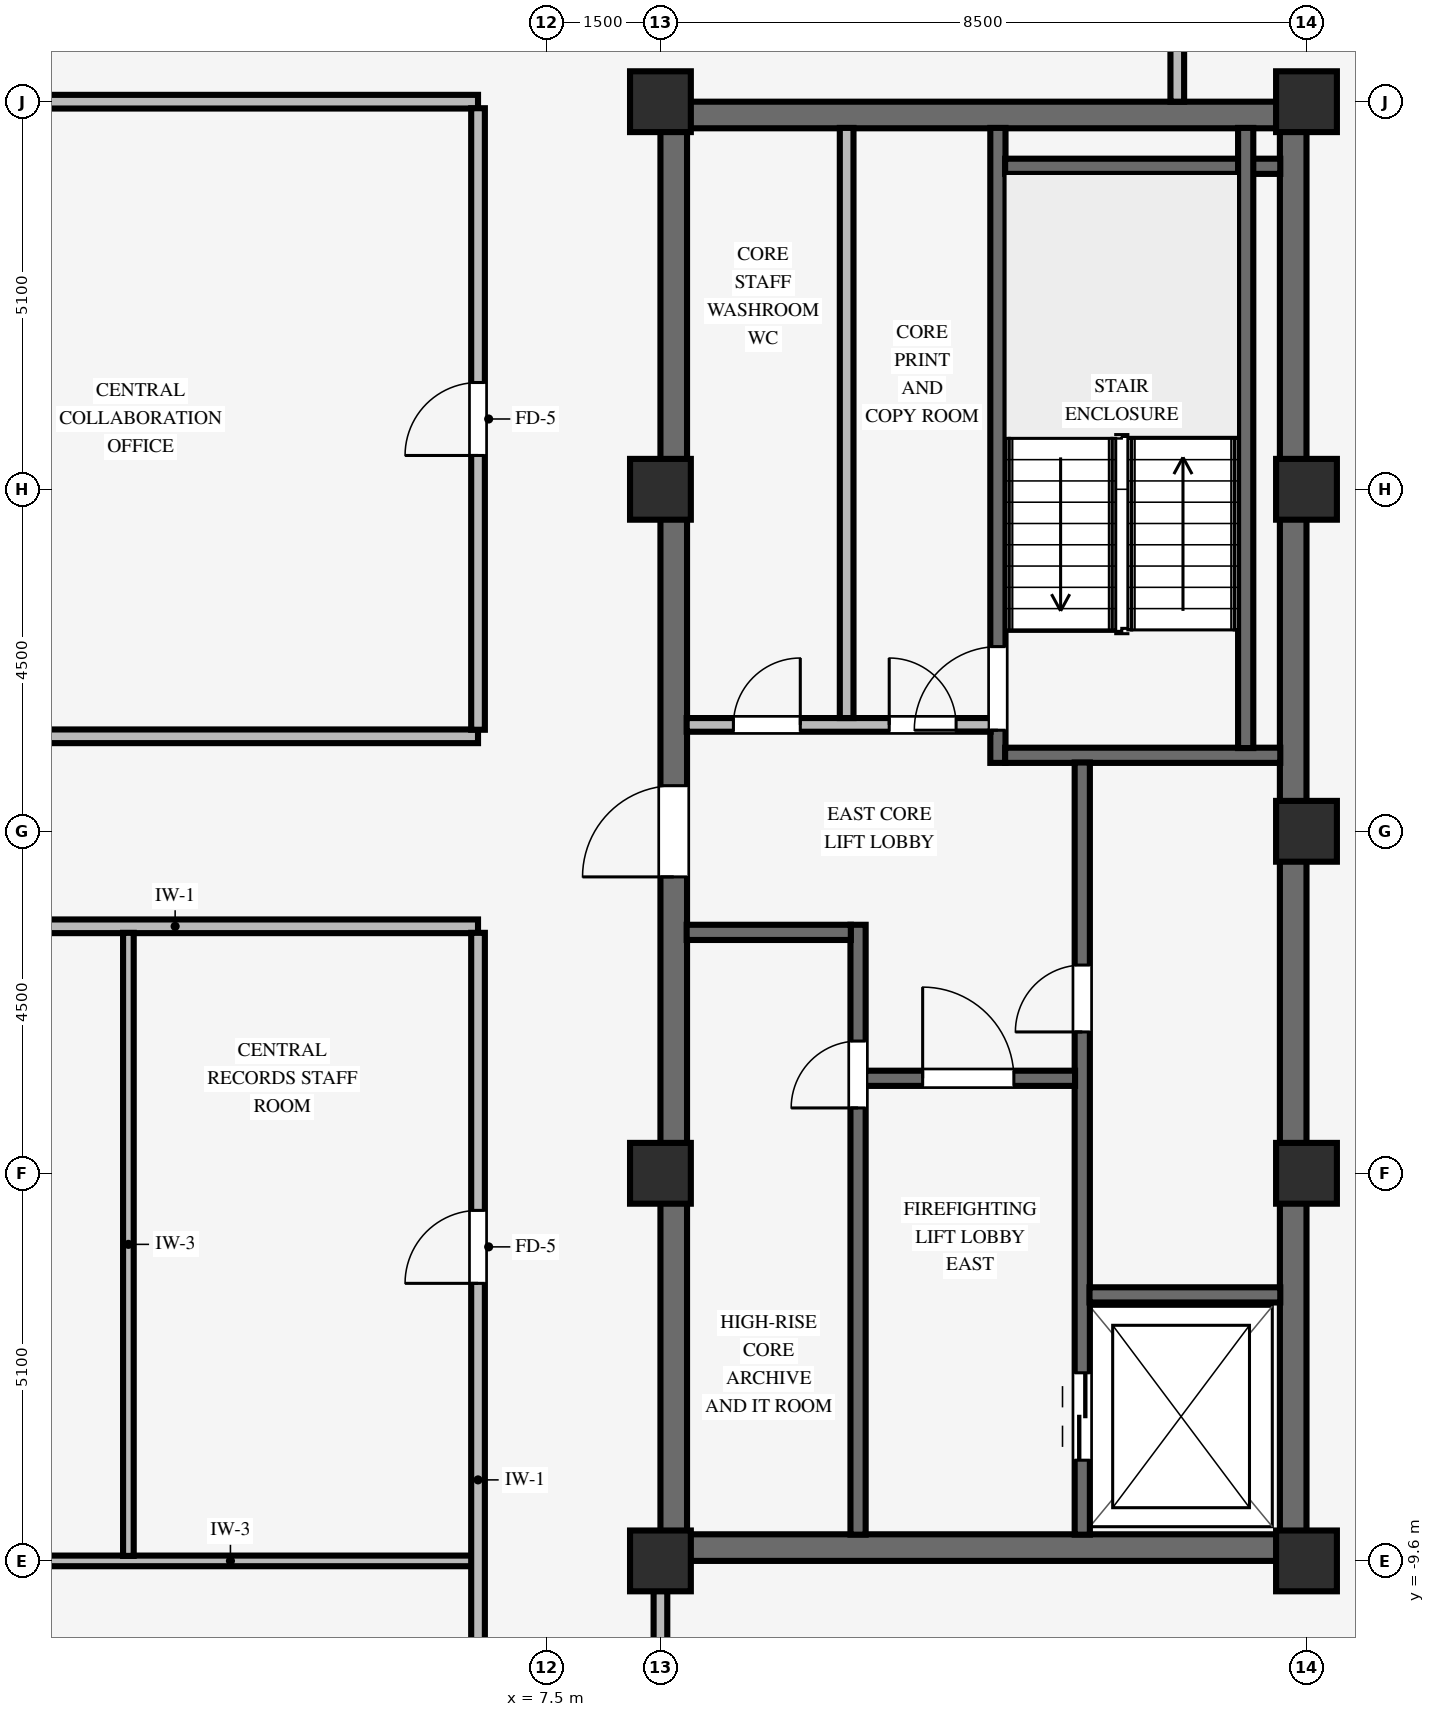
"""IFC4 building model, lengths in metres.
Left out: names, types, materials, properties, quantities, classifications, styles, units other than length and angle.
Written with IfcOpenShell. Run it as: python <this file> out.ifc"""

import sys

from ifc_helpers import new_model, si_unit, direction, frame, frame_2d, origin, origin_2d, place, context, subcontext, project, spatial, rectangle, extrude, source, transform, mapped, element, fill, save


model = new_model("IFC4")
c1 = context("Model", 3, precision=1e-05, world=origin(), true_north=direction((0.0, 1.0)))
c2 = subcontext(c1, "Body", "Model", "MODEL_VIEW")
j1 = project(units=[si_unit("LENGTHUNIT", "METRE"), si_unit("PLANEANGLEUNIT", "RADIAN")], contexts=[c1])
p1 = place(None, origin())
s1 = spatial("IfcSite", under=j1, at=p1, CompositionType="ELEMENT")
p2 = place(p1, origin())
s2 = spatial("IfcBuilding", under=s1, at=p2, CompositionType="ELEMENT")
p3 = place(p2, frame((0.0, 0.0, 279.85)))
s3 = spatial("IfcBuildingStorey", under=s2, at=p3, CompositionType="ELEMENT", Elevation=279.85)
for number, where, z_axis, x_axis in (
    (1, (9.0, -9.425, 0.0), (0.0, 0.0, 1.0), (1.0, 0.0, 0.0)),
    (2, (9.0, 9.425, 0.0), (0.0, 0.0, 1.0), (1.0, 0.0, 0.0)),
):
    element("IfcWall", number, at=place(p3, frame(where, z_axis=z_axis, x_axis=x_axis)), inside=s3, PredefinedType="SHEAR", context=c2, shape_type="SweptSolid", body=[
        extrude(rectangle(XDim=8.5, YDim=0.35, at=frame_2d((4.25, 0.0))), origin(), (0.0, 0.0, 1.0), 3.37),
    ])
p4 = place(p3, frame((9.175, -9.255, 0.0), z_axis=(0.0, 0.0, 1.0), x_axis=(0.0, 1.0, 0.0)))
e3 = element("IfcWall", 3, at=p4, inside=s3, PredefinedType="SHEAR", context=c2, shape_type="SweptSolid", body=[
    extrude(rectangle(XDim=18.51, YDim=0.35, at=frame_2d((9.255, 0.0))), origin(), (0.0, 0.0, 1.0), 3.37),
])
p5 = place(p4, frame((8.655, 0.0, 0.0)))
e4 = element("IfcOpeningElement", 4, at=p5, cuts=e3, PredefinedType="OPENING", context=c2, shape_type="SweptSolid", body=[
    extrude(rectangle(XDim=1.2, YDim=2.15, at=frame_2d((0.6, 1.075))), frame((0.0, 0.185, 0.0), z_axis=(0.0, -1.0, 0.0), x_axis=(1.0, 0.0, 0.0)), (0.0, 0.0, 1.0), 0.37),
])
p6 = place(p3, frame((17.325, -9.255, 0.0), z_axis=(0.0, 0.0, 1.0), x_axis=(0.0, 1.0, 0.0)))
e5 = element("IfcWall", 5, at=p6, inside=s3, PredefinedType="SHEAR", context=c2, shape_type="SweptSolid", body=[
    extrude(rectangle(XDim=18.51, YDim=0.35, at=frame_2d((9.255, 0.0))), origin(), (0.0, 0.0, 1.0), 3.37),
])
for number, where, z_axis, x_axis in (
    (6, (9.0, -9.6, 0.0), (0.0, 0.0, 1.0), (1.0, 0.0, 0.0)),
    (7, (9.0, -4.5, 0.0), (0.0, 0.0, 1.0), (1.0, 0.0, 0.0)),
    (8, (9.0, 4.5, 0.0), (0.0, 0.0, 1.0), (1.0, 0.0, 0.0)),
    (9, (9.0, 9.6, 0.0), (0.0, 0.0, 1.0), (1.0, 0.0, 0.0)),
    (10, (17.5, -9.6, 0.0), (0.0, 0.0, 1.0), (1.0, 0.0, 0.0)),
    (11, (17.5, -4.5, 0.0), (0.0, 0.0, 1.0), (1.0, 0.0, 0.0)),
    (12, (17.5, 4.5, 0.0), (0.0, 0.0, 1.0), (1.0, 0.0, 0.0)),
    (13, (17.5, 9.6, 0.0), (0.0, 0.0, 1.0), (1.0, 0.0, 0.0)),
    (14, (17.5, 0.0, 0.0), (0.0, 0.0, 1.0), (1.0, 0.0, 0.0)),
):
    element("IfcColumn", number, at=place(p3, frame(where, z_axis=z_axis, x_axis=x_axis)), inside=s3, PredefinedType="COLUMN", context=c2, shape_type="SweptSolid", body=[
        extrude(rectangle(XDim=0.8, YDim=0.8, at=origin_2d()), origin(), (0.0, 0.0, 1.0), 3.37),
    ])
p7 = place(p3, frame((13.44, 0.9, 0.0), z_axis=(0.0, 0.0, 1.0), x_axis=(0.0, 1.0, 0.0)))
e15 = element("IfcWall", 15, at=p7, inside=s3, PredefinedType="SHEAR", context=c2, shape_type="SweptSolid", body=[
    extrude(rectangle(XDim=8.355, YDim=0.2, at=frame_2d((4.177, 0.0))), origin(), (0.0, 0.0, 1.0), 3.37),
])
p8 = place(p7, frame((0.43, 0.0, 0.0)))
e16 = element("IfcOpeningElement", 16, at=p8, cuts=e15, PredefinedType="OPENING", context=c2, shape_type="SweptSolid", body=[
    extrude(rectangle(XDim=1.1, YDim=2.15, at=frame_2d((0.55, 1.075))), frame((0.0, 0.11, 0.0), z_axis=(0.0, -1.0, 0.0), x_axis=(1.0, 0.0, 0.0)), (0.0, 0.0, 1.0), 0.22),
])
for number, where, z_axis, x_axis in (
    (17, (13.535, 1.0, 0.0), (0.0, 0.0, 1.0), (1.0, 0.0, 0.0)),
    (18, (13.535, 8.75, 0.0), (0.0, 0.0, 1.0), (1.0, 0.0, 0.0)),
):
    element("IfcWall", number, at=place(p3, frame(where, z_axis=z_axis, x_axis=x_axis)), inside=s3, PredefinedType="SHEAR", context=c2, shape_type="SweptSolid", body=[
        extrude(rectangle(XDim=3.62, YDim=0.2, at=frame_2d((1.81, 0.0))), origin(), (0.0, 0.0, 1.0), 3.37),
    ])
p9 = place(p3, frame((16.7, 1.095, 0.0), z_axis=(0.0, 0.0, 1.0), x_axis=(0.0, 1.0, 0.0)))
e19 = element("IfcWall", 19, at=p9, inside=s3, PredefinedType="SHEAR", context=c2, shape_type="SweptSolid", body=[
    extrude(rectangle(XDim=8.16, YDim=0.2, at=frame_2d((4.08, 0.0))), origin(), (0.0, 0.0, 1.0), 3.37),
])
p10 = place(p3, frame((14.55, -9.255, 0.0), z_axis=(0.0, 0.0, 1.0), x_axis=(0.0, 1.0, 0.0)))
e20 = element("IfcWall", 20, at=p10, inside=s3, PredefinedType="SHEAR", context=c2, shape_type="SweptSolid", body=[
    extrude(rectangle(XDim=10.16, YDim=0.2, at=frame_2d((5.08, 0.0))), origin(), (0.0, 0.0, 1.0), 3.37),
])
p11 = place(p10, frame((6.615, 0.0, 0.0)))
e21 = element("IfcOpeningElement", 21, at=p11, cuts=e20, PredefinedType="OPENING", context=c2, shape_type="SweptSolid", body=[
    extrude(rectangle(XDim=0.88, YDim=2.1, at=frame_2d((0.44, 1.05))), frame((0.0, 0.11, 0.0), z_axis=(0.0, -1.0, 0.0), x_axis=(1.0, 0.0, 0.0)), (0.0, 0.0, 1.0), 0.22),
])
p12 = place(p10, frame((0.98, 0.0, 0.0)))
e22 = element("IfcOpeningElement", 22, at=p12, cuts=e20, PredefinedType="OPENING", context=c2, shape_type="SweptSolid", body=[
    extrude(rectangle(XDim=1.15, YDim=2.15, at=frame_2d((0.575, 1.075))), frame((0.0, 0.11, 0.0), z_axis=(0.0, -1.0, 0.0), x_axis=(1.0, 0.0, 0.0)), (0.0, 0.0, 1.0), 0.22),
])
p13 = place(p3, frame((14.645, -6.1, 0.0), z_axis=(0.0, 0.0, 1.0), x_axis=(1.0, 0.0, 0.0)))
e23 = element("IfcWall", 23, at=p13, inside=s3, PredefinedType="SHEAR", context=c2, shape_type="SweptSolid", body=[
    extrude(rectangle(XDim=2.51, YDim=0.2, at=frame_2d((1.255, 0.0))), origin(), (0.0, 0.0, 1.0), 3.37),
])
p14 = place(p3, frame((11.6, -9.255, 0.0), z_axis=(0.0, 0.0, 1.0), x_axis=(0.0, 1.0, 0.0)))
e24 = element("IfcWall", 24, at=p14, inside=s3, PredefinedType="SHEAR", context=c2, shape_type="SweptSolid", body=[
    extrude(rectangle(XDim=8.025, YDim=0.2, at=frame_2d((4.012, 0.0))), origin(), (0.0, 0.0, 1.0), 3.37),
])
p15 = place(p14, frame((5.615, 0.0, 0.0)))
e25 = element("IfcOpeningElement", 25, at=p15, cuts=e24, PredefinedType="OPENING", context=c2, shape_type="SweptSolid", body=[
    extrude(rectangle(XDim=0.88, YDim=2.1, at=frame_2d((0.44, 1.05))), frame((0.0, 0.11, 0.0), z_axis=(0.0, -1.0, 0.0), x_axis=(1.0, 0.0, 0.0)), (0.0, 0.0, 1.0), 0.22),
])
p16 = place(p3, frame((11.695, -3.25, 0.0), z_axis=(0.0, 0.0, 1.0), x_axis=(1.0, 0.0, 0.0)))
e26 = element("IfcWall", 26, at=p16, inside=s3, PredefinedType="SHEAR", context=c2, shape_type="SweptSolid", body=[
    extrude(rectangle(XDim=2.76, YDim=0.2, at=frame_2d((1.38, 0.0))), origin(), (0.0, 0.0, 1.0), 3.37),
])
p17 = place(p16, frame((0.755, 0.0, 0.0)))
e27 = element("IfcOpeningElement", 27, at=p17, cuts=e26, PredefinedType="OPENING", context=c2, shape_type="SweptSolid", body=[
    extrude(rectangle(XDim=1.2, YDim=2.15, at=frame_2d((0.6, 1.075))), frame((0.0, 0.11, 0.0), z_axis=(0.0, -1.0, 0.0), x_axis=(1.0, 0.0, 0.0)), (0.0, 0.0, 1.0), 0.22),
])
p18 = place(p3, frame((9.345, -1.33, 0.0), z_axis=(0.0, 0.0, 1.0), x_axis=(1.0, 0.0, 0.0)))
e28 = element("IfcWall", 28, at=p18, inside=s3, PredefinedType="SHEAR", context=c2, shape_type="SweptSolid", body=[
    extrude(rectangle(XDim=2.16, YDim=0.2, at=frame_2d((1.08, 0.0))), origin(), (0.0, 0.0, 1.0), 3.37),
])
p19 = place(p3, frame((9.345, 1.4, 0.0), z_axis=(0.0, 0.0, 1.0), x_axis=(1.0, 0.0, 0.0)))
e29 = element("IfcWall", 29, at=p19, inside=s3, PredefinedType="PARTITIONING", context=c2, shape_type="SweptSolid", body=[
    extrude(rectangle(XDim=4.0, YDim=0.18, at=frame_2d((2.0, 0.0))), origin(), (0.0, 0.0, 1.0), 3.36),
])
p20 = place(p19, frame((0.615, 0.0, 0.0)))
e30 = element("IfcOpeningElement", 30, at=p20, cuts=e29, PredefinedType="OPENING", context=c2, shape_type="SweptSolid", body=[
    extrude(rectangle(XDim=0.88, YDim=2.1, at=frame_2d((0.44, 1.05))), frame((0.0, 0.1, 0.0), z_axis=(0.0, -1.0, 0.0), x_axis=(1.0, 0.0, 0.0)), (0.0, 0.0, 1.0), 0.2),
])
p21 = place(p19, frame((2.665, 0.0, 0.0)))
e31 = element("IfcOpeningElement", 31, at=p21, cuts=e29, PredefinedType="OPENING", context=c2, shape_type="SweptSolid", body=[
    extrude(rectangle(XDim=0.88, YDim=2.1, at=frame_2d((0.44, 1.05))), frame((0.0, 0.1, 0.0), z_axis=(0.0, -1.0, 0.0), x_axis=(1.0, 0.0, 0.0)), (0.0, 0.0, 1.0), 0.2),
])
p22 = place(p3, frame((11.45, 1.49, 0.0), z_axis=(0.0, 0.0, 1.0), x_axis=(0.0, 1.0, 0.0)))
e32 = element("IfcWall", 32, at=p22, inside=s3, PredefinedType="PARTITIONING", context=c2, shape_type="SweptSolid", body=[
    extrude(rectangle(XDim=7.765, YDim=0.18, at=frame_2d((3.882, 0.0))), origin(), (0.0, 0.0, 1.0), 3.36),
])
p23 = place(p3, frame((0.151, -9.6, 0.0), z_axis=(0.0, 0.0, 1.0), x_axis=(1.0, 0.0, 0.0)))
e33 = element("IfcWall", 33, at=p23, inside=s3, PredefinedType="PARTITIONING", context=c2, shape_type="SweptSolid", body=[
    extrude(rectangle(XDim=6.383, YDim=0.14, at=frame_2d((3.191, 0.0))), origin(), (0.0, 0.0, 1.0), 2.405),
])
p24 = place(p3, frame((-6.6, -1.25, 0.0), z_axis=(0.0, 0.0, 1.0), x_axis=(1.0, 0.0, 0.0)))
e34 = element("IfcWall", 34, at=p24, inside=s3, PredefinedType="PARTITIONING", context=c2, shape_type="SweptSolid", body=[
    extrude(rectangle(XDim=13.2, YDim=0.18, at=frame_2d((6.6, 0.0))), origin(), (0.0, 0.0, 1.0), 3.36),
])
p25 = place(p24, frame((3.82, 0.0, 0.0)))
e35 = element("IfcOpeningElement", 35, at=p25, cuts=e34, PredefinedType="OPENING", context=c2, shape_type="SweptSolid", body=[
    extrude(rectangle(XDim=0.96, YDim=2.1, at=frame_2d((0.48, 1.05))), frame((0.0, 0.1, 0.0), z_axis=(0.0, -1.0, 0.0), x_axis=(1.0, 0.0, 0.0)), (0.0, 0.0, 1.0), 0.2),
])
p26 = place(p3, frame((-6.6, 1.25, 0.0), z_axis=(0.0, 0.0, 1.0), x_axis=(1.0, 0.0, 0.0)))
e36 = element("IfcWall", 36, at=p26, inside=s3, PredefinedType="PARTITIONING", context=c2, shape_type="SweptSolid", body=[
    extrude(rectangle(XDim=13.2, YDim=0.18, at=frame_2d((6.6, 0.0))), origin(), (0.0, 0.0, 1.0), 3.36),
])
p27 = place(p3, frame((0.151, 9.6, 0.0), z_axis=(0.0, 0.0, 1.0), x_axis=(1.0, 0.0, 0.0)))
e37 = element("IfcWall", 37, at=p27, inside=s3, PredefinedType="PARTITIONING", context=c2, shape_type="SweptSolid", body=[
    extrude(rectangle(XDim=6.449, YDim=0.18, at=frame_2d((3.225, 0.0))), origin(), (0.0, 0.0, 1.0), 2.405),
])
p28 = place(p3, frame((2.0, -9.534, 0.0), z_axis=(0.0, 0.0, 1.0), x_axis=(0.0, 1.0, 0.0)))
e38 = element("IfcWall", 38, at=p28, inside=s3, PredefinedType="PARTITIONING", context=c2, shape_type="SweptSolid", body=[
    extrude(rectangle(XDim=8.198, YDim=0.14, at=frame_2d((4.099, 0.0))), origin(), (0.0, 0.0, 1.0), 3.36),
])
p29 = place(p3, frame((6.6, -19.1, 0.0), z_axis=(0.0, 0.0, 1.0), x_axis=(0.0, 1.0, 0.0)))
e39 = element("IfcWall", 39, at=p29, inside=s3, PredefinedType="PARTITIONING", context=c2, shape_type="SweptSolid", body=[
    extrude(rectangle(XDim=17.764, YDim=0.18, at=frame_2d((8.882, 0.0))), origin(), (0.0, 0.0, 1.0), 3.36),
])
p30 = place(p29, frame((13.152, 0.0, 0.0)))
e40 = element("IfcOpeningElement", 40, at=p30, cuts=e39, PredefinedType="OPENING", context=c2, shape_type="SweptSolid", body=[
    extrude(rectangle(XDim=0.96, YDim=2.1, at=frame_2d((0.48, 1.05))), frame((0.0, 0.1, 0.0), z_axis=(0.0, -1.0, 0.0), x_axis=(1.0, 0.0, 0.0)), (0.0, 0.0, 1.0), 0.2),
])
p31 = place(p29, frame((7.02, 0.0, 0.0)))
e41 = element("IfcOpeningElement", 41, at=p31, cuts=e39, PredefinedType="OPENING", context=c2, shape_type="SweptSolid", body=[
    extrude(rectangle(XDim=0.96, YDim=2.1, at=frame_2d((0.48, 1.05))), frame((0.0, 0.1, 0.0), z_axis=(0.0, -1.0, 0.0), x_axis=(1.0, 0.0, 0.0)), (0.0, 0.0, 1.0), 0.2),
])
p32 = place(p29, frame((4.12, 0.0, 0.0)))
e42 = element("IfcOpeningElement", 42, at=p32, cuts=e39, PredefinedType="OPENING", context=c2, shape_type="SweptSolid", body=[
    extrude(rectangle(XDim=0.96, YDim=2.1, at=frame_2d((0.48, 1.05))), frame((0.0, 0.1, 0.0), z_axis=(0.0, -1.0, 0.0), x_axis=(1.0, 0.0, 0.0)), (0.0, 0.0, 1.0), 0.2),
])
p33 = place(p3, frame((6.6, 1.336, 0.0), z_axis=(0.0, 0.0, 1.0), x_axis=(0.0, 1.0, 0.0)))
e43 = element("IfcWall", 43, at=p33, inside=s3, PredefinedType="PARTITIONING", context=c2, shape_type="SweptSolid", body=[
    extrude(rectangle(XDim=8.178, YDim=0.18, at=frame_2d((4.089, 0.0))), origin(), (0.0, 0.0, 1.0), 3.36),
])
p34 = place(p33, frame((3.609, 0.0, 0.0)))
e44 = element("IfcOpeningElement", 44, at=p34, cuts=e43, PredefinedType="OPENING", context=c2, shape_type="SweptSolid", body=[
    extrude(rectangle(XDim=0.96, YDim=2.1, at=frame_2d((0.48, 1.05))), frame((0.0, 0.1, 0.0), z_axis=(0.0, -1.0, 0.0), x_axis=(1.0, 0.0, 0.0)), (0.0, 0.0, 1.0), 0.2),
])
p35 = place(p3, frame((9.0, -15.314, 0.0), z_axis=(0.0, 0.0, 1.0), x_axis=(0.0, 1.0, 0.0)))
e45 = element("IfcWall", 45, at=p35, inside=s3, PredefinedType="PARTITIONING", context=c2, shape_type="SweptSolid", body=[
    extrude(rectangle(XDim=5.318, YDim=0.18, at=frame_2d((2.659, 0.0))), origin(), (0.0, 0.0, 1.0), 2.892),
])
p36 = place(p35, frame((2.179, 0.0, 0.0)))
e46 = element("IfcOpeningElement", 46, at=p36, cuts=e45, PredefinedType="OPENING", context=c2, shape_type="SweptSolid", body=[
    extrude(rectangle(XDim=0.96, YDim=2.1, at=frame_2d((0.48, 1.05))), frame((0.0, 0.1, 0.0), z_axis=(0.0, -1.0, 0.0), x_axis=(1.0, 0.0, 0.0)), (0.0, 0.0, 1.0), 0.2),
])
p37 = place(p3, frame((15.8, 9.6, 0.0), z_axis=(0.0, 0.0, 1.0), x_axis=(0.0, 1.0, 0.0)))
e47 = element("IfcWall", 47, at=p37, inside=s3, PredefinedType="PARTITIONING", context=c2, shape_type="SweptSolid", body=[
    extrude(rectangle(XDim=2.514, YDim=0.18, at=frame_2d((1.257, 0.0))), origin(), (0.0, 0.0, 1.0), 3.36),
])
m1 = source(origin(), c2, "Body", "SweptSolid", [
    extrude(rectangle(XDim=1.1, YDim=2.15, at=frame_2d((0.55, 1.075))), frame((0.0, 0.025, 0.0), z_axis=(0.0, -1.0, 0.0), x_axis=(1.0, 0.0, 0.0)), (0.0, 0.0, 1.0), 0.05),
])
p38 = place(p8, origin())
e48 = element("IfcDoor", 48, at=p38, inside=s3, OperationType="SINGLE_SWING_LEFT", PredefinedType="DOOR", context=c2, shape_type="MappedRepresentation", body=[
    mapped(m1, transform((0.0, 0.0, 0.0), scale=1.0)),
])
fill(e16, e48)
m2 = source(origin(), c2, "Body", "SweptSolid", [
    extrude(rectangle(XDim=0.88, YDim=2.1, at=frame_2d((0.44, 1.05))), frame((0.0, 0.025, 0.0), z_axis=(0.0, -1.0, 0.0), x_axis=(1.0, 0.0, 0.0)), (0.0, 0.0, 1.0), 0.05),
])
p39 = place(p11, origin())
e49 = element("IfcDoor", 49, at=p39, inside=s3, OperationType="SINGLE_SWING_LEFT", PredefinedType="DOOR", context=c2, shape_type="MappedRepresentation", body=[
    mapped(m2, transform((0.0, 0.0, 0.0), scale=1.0)),
])
fill(e21, e49)
m3 = source(origin(), c2, "Body", "SweptSolid", [
    extrude(rectangle(XDim=1.2, YDim=2.15, at=frame_2d((0.6, 1.075))), frame((0.0, 0.025, 0.0), z_axis=(0.0, -1.0, 0.0), x_axis=(1.0, 0.0, 0.0)), (0.0, 0.0, 1.0), 0.05),
])
p40 = place(p17, origin())
e50 = element("IfcDoor", 50, at=p40, inside=s3, OperationType="SINGLE_SWING_LEFT", PredefinedType="DOOR", context=c2, shape_type="MappedRepresentation", body=[
    mapped(m3, transform((0.0, 0.0, 0.0), scale=1.0)),
])
fill(e27, e50)
p41 = place(p15, origin())
e51 = element("IfcDoor", 51, at=p41, inside=s3, OperationType="SINGLE_SWING_LEFT", PredefinedType="DOOR", context=c2, shape_type="MappedRepresentation", body=[
    mapped(m2, transform((0.0, 0.0, 0.0), scale=1.0)),
])
fill(e25, e51)
p42 = place(p5, origin())
e52 = element("IfcDoor", 52, at=p42, inside=s3, OperationType="SINGLE_SWING_LEFT", PredefinedType="DOOR", context=c2, shape_type="MappedRepresentation", body=[
    mapped(m3, transform((0.0, 0.0, 0.0), scale=1.0)),
])
fill(e4, e52)
p43 = place(p20, origin())
e53 = element("IfcDoor", 53, at=p43, inside=s3, OperationType="SINGLE_SWING_RIGHT", PredefinedType="DOOR", context=c2, shape_type="MappedRepresentation", body=[
    mapped(m2, transform((0.0, 0.0, 0.0), scale=1.0)),
])
fill(e30, e53)
p44 = place(p21, origin())
e54 = element("IfcDoor", 54, at=p44, inside=s3, OperationType="SINGLE_SWING_LEFT", PredefinedType="DOOR", context=c2, shape_type="MappedRepresentation", body=[
    mapped(m2, transform((0.0, 0.0, 0.0), scale=1.0)),
])
fill(e31, e54)
m4 = source(origin(), c2, "Body", "SweptSolid", [
    extrude(rectangle(XDim=1.15, YDim=2.15, at=frame_2d((0.575, 1.075))), frame((0.0, 0.025, 0.0), z_axis=(0.0, -1.0, 0.0), x_axis=(1.0, 0.0, 0.0)), (0.0, 0.0, 1.0), 0.05),
])
p45 = place(p12, origin())
e55 = element("IfcDoor", 55, at=p45, inside=s3, OperationType="DOUBLE_DOOR_SLIDING", PredefinedType="DOOR", context=c2, shape_type="MappedRepresentation", body=[
    mapped(m4, transform((0.0, 0.0, 0.0), scale=1.0)),
])
fill(e22, e55)
m5 = source(origin(), c2, "Body", "SweptSolid", [
    extrude(rectangle(XDim=0.96, YDim=2.1, at=frame_2d((0.48, 1.05))), frame((0.0, 0.025, 0.0), z_axis=(0.0, -1.0, 0.0), x_axis=(1.0, 0.0, 0.0)), (0.0, 0.0, 1.0), 0.05),
])
p46 = place(p30, origin())
e56 = element("IfcDoor", 56, at=p46, inside=s3, OperationType="SINGLE_SWING_LEFT", PredefinedType="DOOR", context=c2, shape_type="MappedRepresentation", body=[
    mapped(m5, transform((0.0, 0.0, 0.0), scale=1.0)),
])
fill(e40, e56)
p47 = place(p34, origin())
e57 = element("IfcDoor", 57, at=p47, inside=s3, OperationType="SINGLE_SWING_LEFT", PredefinedType="DOOR", context=c2, shape_type="MappedRepresentation", body=[
    mapped(m5, transform((0.0, 0.0, 0.0), scale=1.0)),
])
fill(e44, e57)
save(model, sys.argv[1])
